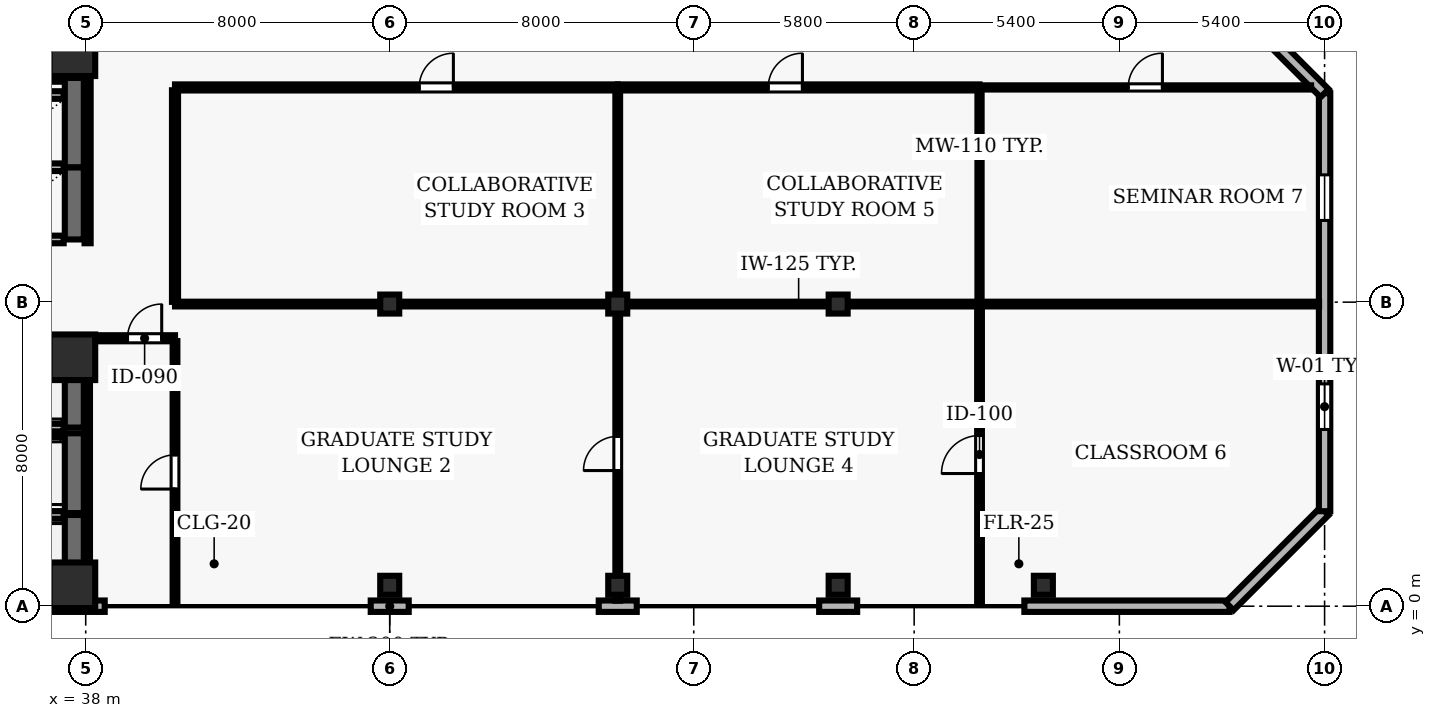
"""IFC4 building model, lengths in metres.
Left out: names, types, materials, properties, quantities, classifications, styles, units other than length and angle.
Written with IfcOpenShell. Run it as: python <this file> out.ifc"""

import sys

from ifc_helpers import new_model, si_unit, direction, frame, frame_2d, origin, origin_2d, place, context, subcontext, project, spatial, rectangle, hollow_rectangle, extrude, element, fill, save


model = new_model("IFC4")
c1 = context("Model", 3, precision=1e-05, world=origin(), true_north=direction((0.0, 1.0)))
c2 = subcontext(c1, "Body", "Model", "MODEL_VIEW")
j1 = project(units=[si_unit("LENGTHUNIT", "METRE"), si_unit("PLANEANGLEUNIT", "RADIAN")], contexts=[c1])
p1 = place(None, origin())
s1 = spatial("IfcSite", under=j1, at=p1, CompositionType="ELEMENT")
p2 = place(p1, origin())
s2 = spatial("IfcBuilding", under=s1, at=p2, CompositionType="ELEMENT")
p3 = place(p2, frame((0.0, 0.0, 142.4)))
s3 = spatial("IfcBuildingStorey", under=s2, at=p3, CompositionType="ELEMENT", Elevation=142.4)
for number, where, z_axis, x_axis in (
    (1, (37.65, 0.55, 0.0), (0.0, 0.0, 1.0), (1.0, 0.0, 0.0)),
    (2, (37.65, 6.55, 0.0), (0.0, 0.0, 1.0), (1.0, 0.0, 0.0)),
    (3, (37.65, 14.55, 0.0), (0.0, 0.0, 1.0), (1.0, 0.0, 0.0)),
):
    element("IfcColumn", number, at=place(p3, frame(where, z_axis=z_axis, x_axis=x_axis)), inside=s3, PredefinedType="COLUMN", context=c2, shape_type="SweptSolid", body=[
        extrude(rectangle(XDim=1.2, YDim=1.2, at=origin_2d()), origin(), (0.0, 0.0, 1.0), 3.9),
    ])
for number, where, z_axis, x_axis in (
    (4, (46.0, 0.55, 0.0), (0.0, 0.0, 1.0), (1.0, 0.0, 0.0)),
    (5, (46.0, 7.95, 0.0), (0.0, 0.0, 1.0), (1.0, 0.0, 0.0)),
    (6, (52.0, 0.55, 0.0), (0.0, 0.0, 1.0), (1.0, 0.0, 0.0)),
    (7, (52.0, 7.95, 0.0), (0.0, 0.0, 1.0), (1.0, 0.0, 0.0)),
    (8, (57.8, 0.55, 0.0), (0.0, 0.0, 1.0), (1.0, 0.0, 0.0)),
    (9, (57.8, 7.95, 0.0), (0.0, 0.0, 1.0), (1.0, 0.0, 0.0)),
    (10, (63.2, 0.55, 0.0), (0.0, 0.0, 1.0), (1.0, 0.0, 0.0)),
):
    element("IfcColumn", number, at=place(p3, frame(where, z_axis=z_axis, x_axis=x_axis)), inside=s3, PredefinedType="COLUMN", context=c2, shape_type="SweptSolid", body=[
        extrude(hollow_rectangle(XDim=0.5, YDim=0.5, WallThickness=0.025, at=origin_2d()), origin(), (0.0, 0.0, 1.0), 3.9),
    ])
p4 = place(p3, frame((30.9, 0.0, 0.0), z_axis=(0.0, 0.0, 1.0), x_axis=(1.0, 0.0, 0.0)))
e11 = element("IfcWall", 11, at=p4, inside=s3, PredefinedType="SOLIDWALL", context=c2, shape_type="SweptSolid", body=[
    extrude(rectangle(XDim=7.6, YDim=0.3, at=frame_2d((3.8, 0.0))), origin(), (0.0, 0.0, 1.0), 3.69),
])
for number, where, z_axis, x_axis in (
    (12, (45.5, 0.0, 0.0), (0.0, 0.0, 1.0), (1.0, 0.0, 0.0)),
    (13, (51.5, 0.0, 0.0), (0.0, 0.0, 1.0), (1.0, 0.0, 0.0)),
    (14, (57.3, 0.0, 0.0), (0.0, 0.0, 1.0), (1.0, 0.0, 0.0)),
):
    element("IfcWall", number, at=place(p3, frame(where, z_axis=z_axis, x_axis=x_axis)), inside=s3, PredefinedType="SOLIDWALL", context=c2, shape_type="SweptSolid", body=[
        extrude(rectangle(XDim=1.0, YDim=0.3, at=frame_2d((0.5, 0.0))), origin(), (0.0, 0.0, 1.0), 3.69),
    ])
p5 = place(p3, frame((62.7, 0.0, 0.0), z_axis=(0.0, 0.0, 1.0), x_axis=(1.0, 0.0, 0.0)))
e15 = element("IfcWall", 15, at=p5, inside=s3, PredefinedType="SOLIDWALL", context=c2, shape_type="SweptSolid", body=[
    extrude(rectangle(XDim=5.4, YDim=0.3, at=frame_2d((2.7, 0.0))), origin(), (0.0, 0.0, 1.0), 3.69),
])
p6 = place(p3, frame((68.1, 0.0, 0.0), z_axis=(0.0, 0.0, 1.0), x_axis=(0.707106781187, 0.707106781187, 0.0)))
e16 = element("IfcWall", 16, at=p6, inside=s3, PredefinedType="SOLIDWALL", context=c2, shape_type="SweptSolid", body=[
    extrude(rectangle(XDim=3.536, YDim=0.3, at=frame_2d((1.768, 0.0))), origin(), (0.0, 0.0, 1.0), 3.69),
])
p7 = place(p3, frame((70.6, 2.5, 0.0), z_axis=(0.0, 0.0, 1.0), x_axis=(0.0, 1.0, 0.0)))
e17 = element("IfcWall", 17, at=p7, inside=s3, PredefinedType="SOLIDWALL", context=c2, shape_type="SweptSolid", body=[
    extrude(rectangle(XDim=11.0, YDim=0.3, at=frame_2d((5.5, 0.0))), origin(), (0.0, 0.0, 1.0), 3.69),
])
p8 = place(p7, frame((2.15, 0.0, 0.9)))
e18 = element("IfcOpeningElement", 18, at=p8, cuts=e17, PredefinedType="OPENING", context=c2, shape_type="SweptSolid", body=[
    extrude(rectangle(XDim=1.2, YDim=1.6, at=frame_2d((0.6, 0.8))), frame((0.0, 0.16, 0.0), z_axis=(0.0, -1.0, 0.0), x_axis=(1.0, 0.0, 0.0)), (0.0, 0.0, 1.0), 0.32),
])
p9 = place(p7, frame((7.65, 0.0, 0.9)))
e19 = element("IfcOpeningElement", 19, at=p9, cuts=e17, PredefinedType="OPENING", context=c2, shape_type="SweptSolid", body=[
    extrude(rectangle(XDim=1.2, YDim=1.6, at=frame_2d((0.6, 0.8))), frame((0.0, 0.16, 0.0), z_axis=(0.0, -1.0, 0.0), x_axis=(1.0, 0.0, 0.0)), (0.0, 0.0, 1.0), 0.32),
])
p10 = place(p3, frame((70.6, 13.5, 0.0), z_axis=(0.0, 0.0, 1.0), x_axis=(-0.707106781187, 0.707106781187, 0.0)))
e20 = element("IfcWall", 20, at=p10, inside=s3, PredefinedType="SOLIDWALL", context=c2, shape_type="SweptSolid", body=[
    extrude(rectangle(XDim=3.536, YDim=0.3, at=frame_2d((1.768, 0.0))), origin(), (0.0, 0.0, 1.0), 3.69),
])
p11 = place(p3, frame((37.7, 0.3, 0.0), z_axis=(0.0, 0.0, 1.0), x_axis=(0.0, 1.0, 0.0)))
e21 = element("IfcWall", 21, at=p11, inside=s3, PredefinedType="SHEAR", context=c2, shape_type="SweptSolid", body=[
    extrude(rectangle(XDim=2.1, YDim=0.5, at=frame_2d((1.05, 0.0))), origin(), (0.0, 0.0, 1.0), 3.69),
])
for number, where, z_axis, x_axis in (
    (22, (35.28, 0.3, 0.0), (0.0, 0.0, 1.0), (1.0, 0.0, 0.0)),
    (23, (37.42, 2.4, 0.0), (0.0, 0.0, 1.0), (-1.0, 0.0, 0.0)),
):
    element("IfcWall", number, at=place(p3, frame(where, z_axis=z_axis, x_axis=x_axis)), inside=s3, PredefinedType="SOLIDWALL", context=c2, shape_type="SweptSolid", body=[
        extrude(rectangle(XDim=2.14, YDim=0.2, at=frame_2d((1.07, 0.0))), origin(), (0.0, 0.0, 1.0), 3.69),
    ])
p12 = place(p3, frame((37.7, 2.45, 0.0), z_axis=(0.0, 0.0, 1.0), x_axis=(0.0, 1.0, 0.0)))
e24 = element("IfcWall", 24, at=p12, inside=s3, PredefinedType="SHEAR", context=c2, shape_type="SweptSolid", body=[
    extrude(rectangle(XDim=2.1, YDim=0.5, at=frame_2d((1.05, 0.0))), origin(), (0.0, 0.0, 1.0), 3.69),
])
p13 = place(p3, frame((37.42, 4.55, 0.0), z_axis=(0.0, 0.0, 1.0), x_axis=(-1.0, 0.0, 0.0)))
e25 = element("IfcWall", 25, at=p13, inside=s3, PredefinedType="SOLIDWALL", context=c2, shape_type="SweptSolid", body=[
    extrude(rectangle(XDim=2.14, YDim=0.2, at=frame_2d((1.07, 0.0))), origin(), (0.0, 0.0, 1.0), 3.69),
])
p14 = place(p3, frame((37.7, 4.7, 0.0), z_axis=(0.0, 0.0, 1.0), x_axis=(0.0, 1.0, 0.0)))
e26 = element("IfcWall", 26, at=p14, inside=s3, PredefinedType="SHEAR", context=c2, shape_type="SweptSolid", body=[
    extrude(rectangle(XDim=2.25, YDim=0.5, at=frame_2d((1.125, 0.0))), origin(), (0.0, 0.0, 1.0), 3.69),
])
for number, where, z_axis, x_axis in (
    (27, (35.28, 4.7, 0.0), (0.0, 0.0, 1.0), (1.0, 0.0, 0.0)),
    (28, (37.42, 6.95, 0.0), (0.0, 0.0, 1.0), (-1.0, 0.0, 0.0)),
):
    element("IfcWall", number, at=place(p3, frame(where, z_axis=z_axis, x_axis=x_axis)), inside=s3, PredefinedType="SOLIDWALL", context=c2, shape_type="SweptSolid", body=[
        extrude(rectangle(XDim=2.14, YDim=0.2, at=frame_2d((1.07, 0.0))), origin(), (0.0, 0.0, 1.0), 3.69),
    ])
p15 = place(p3, frame((37.7, 9.65, 0.0), z_axis=(0.0, 0.0, 1.0), x_axis=(0.0, 1.0, 0.0)))
e29 = element("IfcWall", 29, at=p15, inside=s3, PredefinedType="SHEAR", context=c2, shape_type="SweptSolid", body=[
    extrude(rectangle(XDim=1.9, YDim=0.5, at=frame_2d((0.95, 0.0))), origin(), (0.0, 0.0, 1.0), 3.69),
])
for number, where, z_axis, x_axis in (
    (30, (35.28, 9.65, 0.0), (0.0, 0.0, 1.0), (1.0, 0.0, 0.0)),
    (31, (37.42, 11.55, 0.0), (0.0, 0.0, 1.0), (-1.0, 0.0, 0.0)),
):
    element("IfcWall", number, at=place(p3, frame(where, z_axis=z_axis, x_axis=x_axis)), inside=s3, PredefinedType="SOLIDWALL", context=c2, shape_type="SweptSolid", body=[
        extrude(rectangle(XDim=2.14, YDim=0.2, at=frame_2d((1.07, 0.0))), origin(), (0.0, 0.0, 1.0), 3.69),
    ])
p16 = place(p3, frame((37.7, 11.55, 0.0), z_axis=(0.0, 0.0, 1.0), x_axis=(0.0, 1.0, 0.0)))
e32 = element("IfcWall", 32, at=p16, inside=s3, PredefinedType="SHEAR", context=c2, shape_type="SweptSolid", body=[
    extrude(rectangle(XDim=2.35, YDim=0.5, at=frame_2d((1.175, 0.0))), origin(), (0.0, 0.0, 1.0), 3.69),
])
p17 = place(p3, frame((37.42, 13.45, 0.0), z_axis=(0.0, 0.0, 1.0), x_axis=(-1.0, 0.0, 0.0)))
e33 = element("IfcWall", 33, at=p17, inside=s3, PredefinedType="SOLIDWALL", context=c2, shape_type="SweptSolid", body=[
    extrude(rectangle(XDim=2.14, YDim=0.2, at=frame_2d((1.07, 0.0))), origin(), (0.0, 0.0, 1.0), 3.69),
])
p18 = place(p3, frame((37.7, 13.9, 0.0), z_axis=(0.0, 0.0, 1.0), x_axis=(0.0, 1.0, 0.0)))
e34 = element("IfcWall", 34, at=p18, inside=s3, PredefinedType="SHEAR", context=c2, shape_type="SweptSolid", body=[
    extrude(rectangle(XDim=1.85, YDim=0.5, at=frame_2d((0.925, 0.0))), origin(), (0.0, 0.0, 1.0), 3.69),
])
p19 = place(p3, frame((35.28, 13.9, 0.0), z_axis=(0.0, 0.0, 1.0), x_axis=(1.0, 0.0, 0.0)))
e35 = element("IfcWall", 35, at=p19, inside=s3, PredefinedType="SOLIDWALL", context=c2, shape_type="SweptSolid", body=[
    extrude(rectangle(XDim=2.14, YDim=0.2, at=frame_2d((1.07, 0.0))), origin(), (0.0, 0.0, 1.0), 3.69),
])
p20 = place(p3, frame((38.05, 7.05, 0.0), z_axis=(0.0, 0.0, 1.0), x_axis=(1.0, 0.0, 0.0)))
e36 = element("IfcWall", 36, at=p20, inside=s3, PredefinedType="PARTITIONING", context=c2, shape_type="SweptSolid", body=[
    extrude(rectangle(XDim=2.3, YDim=0.16, at=frame_2d((1.15, 0.0))), origin(), (0.0, 0.0, 1.0), 3.69),
])
p21 = place(p20, frame((1.05, 0.0, 0.0)))
e37 = element("IfcOpeningElement", 37, at=p21, cuts=e36, PredefinedType="OPENING", context=c2, shape_type="SweptSolid", body=[
    extrude(rectangle(XDim=0.9, YDim=2.1, at=frame_2d((0.45, 1.05))), frame((0.0, 0.09, 0.0), z_axis=(0.0, -1.0, 0.0), x_axis=(1.0, 0.0, 0.0)), (0.0, 0.0, 1.0), 0.18),
])
p22 = place(p3, frame((40.35, 13.65, 0.0), z_axis=(0.0, 0.0, 1.0), x_axis=(1.0, 0.0, 0.0)))
e38 = element("IfcWall", 38, at=p22, inside=s3, PredefinedType="PARTITIONING", context=c2, shape_type="SweptSolid", body=[
    extrude(rectangle(XDim=11.65, YDim=0.16, at=frame_2d((5.825, 0.0))), origin(), (0.0, 0.0, 1.0), 3.69),
])
p23 = place(p22, frame((6.425, 0.0, 0.0)))
e39 = element("IfcOpeningElement", 39, at=p23, cuts=e38, PredefinedType="OPENING", context=c2, shape_type="SweptSolid", body=[
    extrude(rectangle(XDim=0.9, YDim=2.1, at=frame_2d((0.45, 1.05))), frame((0.0, 0.09, 0.0), z_axis=(0.0, -1.0, 0.0), x_axis=(1.0, 0.0, 0.0)), (0.0, 0.0, 1.0), 0.18),
])
p24 = place(p3, frame((52.0, 7.95, 0.0), z_axis=(0.0, 0.0, 1.0), x_axis=(-1.0, 0.0, 0.0)))
e40 = element("IfcWall", 40, at=p24, inside=s3, PredefinedType="PARTITIONING", context=c2, shape_type="SweptSolid", body=[
    extrude(rectangle(XDim=11.65, YDim=0.125, at=frame_2d((5.825, 0.0))), origin(), (0.0, 0.0, 1.0), 3.074),
])
p25 = place(p3, frame((52.0, 13.65, 0.0), z_axis=(0.0, 0.0, 1.0), x_axis=(1.0, 0.0, 0.0)))
e41 = element("IfcWall", 41, at=p25, inside=s3, PredefinedType="PARTITIONING", context=c2, shape_type="SweptSolid", body=[
    extrude(rectangle(XDim=9.52, YDim=0.16, at=frame_2d((4.76, 0.0))), origin(), (0.0, 0.0, 1.0), 3.69),
])
p26 = place(p25, frame((3.96, 0.0, 0.0)))
e42 = element("IfcOpeningElement", 42, at=p26, cuts=e41, PredefinedType="OPENING", context=c2, shape_type="SweptSolid", body=[
    extrude(rectangle(XDim=0.9, YDim=2.1, at=frame_2d((0.45, 1.05))), frame((0.0, 0.09, 0.0), z_axis=(0.0, -1.0, 0.0), x_axis=(1.0, 0.0, 0.0)), (0.0, 0.0, 1.0), 0.18),
])
p27 = place(p3, frame((61.52, 7.95, 0.0), z_axis=(0.0, 0.0, 1.0), x_axis=(-1.0, 0.0, 0.0)))
e43 = element("IfcWall", 43, at=p27, inside=s3, PredefinedType="PARTITIONING", context=c2, shape_type="SweptSolid", body=[
    extrude(rectangle(XDim=9.52, YDim=0.125, at=frame_2d((4.76, 0.0))), origin(), (0.0, 0.0, 1.0), 3.074),
])
p28 = place(p3, frame((61.52, 13.65, 0.0), z_axis=(0.0, 0.0, 1.0), x_axis=(1.0, 0.0, 0.0)))
e44 = element("IfcWall", 44, at=p28, inside=s3, PredefinedType="MOVABLE", context=c2, shape_type="SweptSolid", body=[
    extrude(rectangle(XDim=8.725, YDim=0.11, at=frame_2d((4.363, 0.0))), origin(), (0.0, 0.0, 1.0), 3.69),
])
p29 = place(p28, frame((3.913, 0.0, 0.0)))
e45 = element("IfcOpeningElement", 45, at=p29, cuts=e44, PredefinedType="OPENING", context=c2, shape_type="SweptSolid", body=[
    extrude(rectangle(XDim=0.9, YDim=2.1, at=frame_2d((0.45, 1.05))), frame((0.0, 0.065, 0.0), z_axis=(0.0, -1.0, 0.0), x_axis=(1.0, 0.0, 0.0)), (0.0, 0.0, 1.0), 0.13),
])
p30 = place(p3, frame((70.455, 7.95, 0.0), z_axis=(0.0, 0.0, 1.0), x_axis=(-1.0, 0.0, 0.0)))
e46 = element("IfcWall", 46, at=p30, inside=s3, PredefinedType="PARTITIONING", context=c2, shape_type="SweptSolid", body=[
    extrude(rectangle(XDim=8.935, YDim=0.125, at=frame_2d((4.468, 0.0))), origin(), (0.0, 0.0, 1.0), 3.69),
])
p31 = place(p3, frame((38.05, 6.975, 0.0), z_axis=(0.0, 0.0, 1.0), x_axis=(0.0, -1.0, 0.0)))
e47 = element("IfcWall", 47, at=p31, inside=s3, PredefinedType="PARTITIONING", context=c2, shape_type="SweptSolid", body=[
    extrude(rectangle(XDim=6.83, YDim=0.125, at=frame_2d((3.415, 0.0))), origin(), (0.0, 0.0, 1.0), 3.074),
])
p32 = place(p3, frame((38.05, 15.925, 0.0), z_axis=(0.0, 0.0, 1.0), x_axis=(0.0, -1.0, 0.0)))
e48 = element("IfcWall", 48, at=p32, inside=s3, PredefinedType="PARTITIONING", context=c2, shape_type="SweptSolid", body=[
    extrude(rectangle(XDim=6.375, YDim=0.16, at=frame_2d((3.188, 0.0))), origin(), (0.0, 0.0, 1.0), 3.074),
])
p33 = place(p3, frame((40.35, 0.09, 0.0), z_axis=(0.0, 0.0, 1.0), x_axis=(0.0, 1.0, 0.0)))
e49 = element("IfcWall", 49, at=p33, inside=s3, PredefinedType="PARTITIONING", context=c2, shape_type="SweptSolid", body=[
    extrude(rectangle(XDim=6.885, YDim=0.125, at=frame_2d((3.442, 0.0))), origin(), (0.0, 0.0, 1.0), 3.69),
])
p34 = place(p33, frame((2.992, 0.0, 0.0)))
e50 = element("IfcOpeningElement", 50, at=p34, cuts=e49, PredefinedType="OPENING", context=c2, shape_type="SweptSolid", body=[
    extrude(rectangle(XDim=0.9, YDim=2.1, at=frame_2d((0.45, 1.05))), frame((0.0, 0.073, 0.0), z_axis=(0.0, -1.0, 0.0), x_axis=(1.0, 0.0, 0.0)), (0.0, 0.0, 1.0), 0.145),
])
p35 = place(p3, frame((40.35, 8.008, 0.0), z_axis=(0.0, 0.0, 1.0), x_axis=(0.0, 1.0, 0.0)))
e51 = element("IfcWall", 51, at=p35, inside=s3, PredefinedType="PARTITIONING", context=c2, shape_type="SweptSolid", body=[
    extrude(rectangle(XDim=5.567, YDim=0.16, at=frame_2d((2.783, 0.0))), origin(), (0.0, 0.0, 1.0), 3.69),
])
p36 = place(p3, frame((52.0, 0.145, 0.0), z_axis=(0.0, 0.0, 1.0), x_axis=(0.0, 1.0, 0.0)))
e52 = element("IfcWall", 52, at=p36, inside=s3, PredefinedType="PARTITIONING", context=c2, shape_type="SweptSolid", body=[
    extrude(rectangle(XDim=7.748, YDim=0.125, at=frame_2d((3.874, 0.0))), origin(), (0.0, 0.0, 1.0), 3.074),
])
p37 = place(p36, frame((3.424, 0.0, 0.0)))
e53 = element("IfcOpeningElement", 53, at=p37, cuts=e52, PredefinedType="OPENING", context=c2, shape_type="SweptSolid", body=[
    extrude(rectangle(XDim=0.9, YDim=2.1, at=frame_2d((0.45, 1.05))), frame((0.0, 0.073, 0.0), z_axis=(0.0, -1.0, 0.0), x_axis=(1.0, 0.0, 0.0)), (0.0, 0.0, 1.0), 0.145),
])
p38 = place(p3, frame((52.0, 8.008, 0.0), z_axis=(0.0, 0.0, 1.0), x_axis=(0.0, 1.0, 0.0)))
e54 = element("IfcWall", 54, at=p38, inside=s3, PredefinedType="PARTITIONING", context=c2, shape_type="SweptSolid", body=[
    extrude(rectangle(XDim=5.567, YDim=0.125, at=frame_2d((2.783, 0.0))), origin(), (0.0, 0.0, 1.0), 3.074),
])
p39 = place(p3, frame((61.52, 0.09, 0.0), z_axis=(0.0, 0.0, 1.0), x_axis=(0.0, 1.0, 0.0)))
e55 = element("IfcWall", 55, at=p39, inside=s3, PredefinedType="PARTITIONING", context=c2, shape_type="SweptSolid", body=[
    extrude(rectangle(XDim=7.803, YDim=0.125, at=frame_2d((3.901, 0.0))), origin(), (0.0, 0.0, 1.0), 3.69),
])
p40 = place(p39, frame((3.401, 0.0, 0.0)))
e56 = element("IfcOpeningElement", 56, at=p40, cuts=e55, PredefinedType="OPENING", context=c2, shape_type="SweptSolid", body=[
    extrude(rectangle(XDim=1.0, YDim=2.1, at=frame_2d((0.5, 1.05))), frame((0.0, 0.073, 0.0), z_axis=(0.0, -1.0, 0.0), x_axis=(1.0, 0.0, 0.0)), (0.0, 0.0, 1.0), 0.145),
])
p41 = place(p3, frame((61.52, 8.008, 0.0), z_axis=(0.0, 0.0, 1.0), x_axis=(0.0, 1.0, 0.0)))
e57 = element("IfcWall", 57, at=p41, inside=s3, PredefinedType="MOVABLE", context=c2, shape_type="SweptSolid", body=[
    extrude(rectangle(XDim=5.567, YDim=0.11, at=frame_2d((2.783, 0.0))), origin(), (0.0, 0.0, 1.0), 3.69),
])
p42 = place(p8, origin())
e58 = element("IfcWindow", 58, at=p42, inside=s3, PartitioningType="SINGLE_PANEL", PredefinedType="WINDOW", context=c2, shape_type="SweptSolid", body=[
    extrude(rectangle(XDim=1.2, YDim=1.6, at=frame_2d((0.6, 0.8))), frame((0.0, 0.03, 0.0), z_axis=(0.0, -1.0, 0.0), x_axis=(1.0, 0.0, 0.0)), (0.0, 0.0, 1.0), 0.06),
])
fill(e18, e58)
p43 = place(p9, origin())
e59 = element("IfcWindow", 59, at=p43, inside=s3, PartitioningType="SINGLE_PANEL", PredefinedType="WINDOW", context=c2, shape_type="SweptSolid", body=[
    extrude(rectangle(XDim=1.2, YDim=1.6, at=frame_2d((0.6, 0.8))), frame((0.0, 0.03, 0.0), z_axis=(0.0, -1.0, 0.0), x_axis=(1.0, 0.0, 0.0)), (0.0, 0.0, 1.0), 0.06),
])
fill(e19, e59)
p44 = place(p21, origin())
e60 = element("IfcDoor", 60, at=p44, inside=s3, OperationType="SINGLE_SWING_RIGHT", PredefinedType="DOOR", context=c2, shape_type="SweptSolid", body=[
    extrude(rectangle(XDim=0.9, YDim=2.1, at=frame_2d((0.45, 1.05))), frame((0.0, 0.025, 0.0), z_axis=(0.0, -1.0, 0.0), x_axis=(1.0, 0.0, 0.0)), (0.0, 0.0, 1.0), 0.05),
])
fill(e37, e60)
p45 = place(p34, origin())
e61 = element("IfcDoor", 61, at=p45, inside=s3, OperationType="SINGLE_SWING_LEFT", PredefinedType="DOOR", context=c2, shape_type="SweptSolid", body=[
    extrude(rectangle(XDim=0.9, YDim=2.1, at=frame_2d((0.45, 1.05))), frame((0.0, 0.025, 0.0), z_axis=(0.0, -1.0, 0.0), x_axis=(1.0, 0.0, 0.0)), (0.0, 0.0, 1.0), 0.05),
])
fill(e50, e61)
p46 = place(p23, origin())
e62 = element("IfcDoor", 62, at=p46, inside=s3, OperationType="SINGLE_SWING_RIGHT", PredefinedType="DOOR", context=c2, shape_type="SweptSolid", body=[
    extrude(rectangle(XDim=0.9, YDim=2.1, at=frame_2d((0.45, 1.05))), frame((0.0, 0.025, 0.0), z_axis=(0.0, -1.0, 0.0), x_axis=(1.0, 0.0, 0.0)), (0.0, 0.0, 1.0), 0.05),
])
fill(e39, e62)
p47 = place(p37, origin())
e63 = element("IfcDoor", 63, at=p47, inside=s3, OperationType="SINGLE_SWING_LEFT", PredefinedType="DOOR", context=c2, shape_type="SweptSolid", body=[
    extrude(rectangle(XDim=0.9, YDim=2.1, at=frame_2d((0.45, 1.05))), frame((0.0, 0.025, 0.0), z_axis=(0.0, -1.0, 0.0), x_axis=(1.0, 0.0, 0.0)), (0.0, 0.0, 1.0), 0.05),
])
fill(e53, e63)
p48 = place(p26, origin())
e64 = element("IfcDoor", 64, at=p48, inside=s3, OperationType="SINGLE_SWING_RIGHT", PredefinedType="DOOR", context=c2, shape_type="SweptSolid", body=[
    extrude(rectangle(XDim=0.9, YDim=2.1, at=frame_2d((0.45, 1.05))), frame((0.0, 0.025, 0.0), z_axis=(0.0, -1.0, 0.0), x_axis=(1.0, 0.0, 0.0)), (0.0, 0.0, 1.0), 0.05),
])
fill(e42, e64)
p49 = place(p40, origin())
e65 = element("IfcDoor", 65, at=p49, inside=s3, OperationType="SINGLE_SWING_LEFT", PredefinedType="DOOR", context=c2, shape_type="SweptSolid", body=[
    extrude(rectangle(XDim=1.0, YDim=2.1, at=frame_2d((0.5, 1.05))), frame((0.0, 0.025, 0.0), z_axis=(0.0, -1.0, 0.0), x_axis=(1.0, 0.0, 0.0)), (0.0, 0.0, 1.0), 0.05),
])
fill(e56, e65)
p50 = place(p29, origin())
e66 = element("IfcDoor", 66, at=p50, inside=s3, OperationType="SINGLE_SWING_RIGHT", PredefinedType="DOOR", context=c2, shape_type="SweptSolid", body=[
    extrude(rectangle(XDim=0.9, YDim=2.1, at=frame_2d((0.45, 1.05))), frame((0.0, 0.025, 0.0), z_axis=(0.0, -1.0, 0.0), x_axis=(1.0, 0.0, 0.0)), (0.0, 0.0, 1.0), 0.05),
])
fill(e45, e66)
save(model, sys.argv[1])
